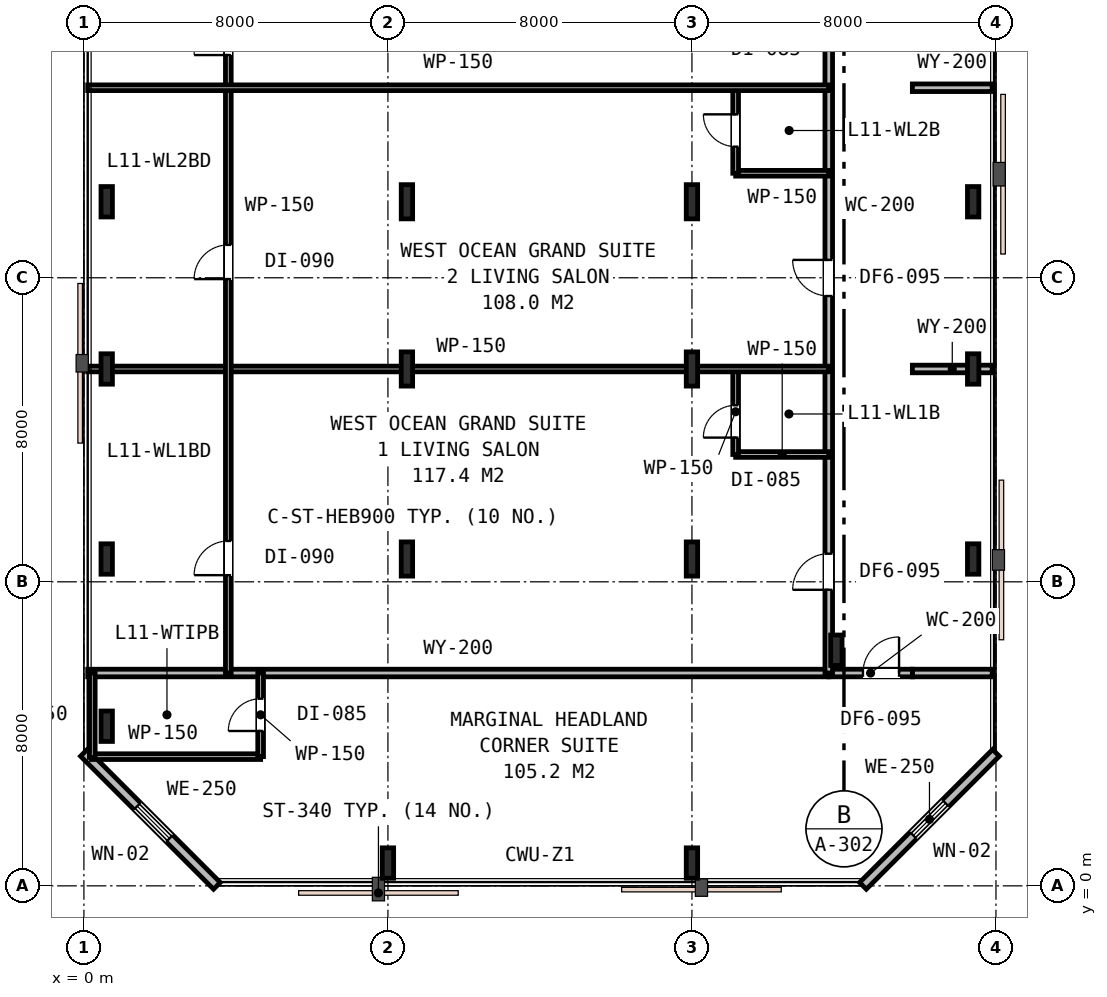
"""IFC4 building model, lengths in metres.
Left out: names, types, materials, properties, quantities, classifications, styles, units other than length and angle.
Written with IfcOpenShell. Run it as: python <this file> out.ifc"""

import sys

from ifc_helpers import new_model, si_unit, direction, frame, frame_2d, origin, origin_2d, place, context, subcontext, project, spatial, rectangle, i_section, extrude, element, fill, save


model = new_model("IFC4")
c1 = context("Model", 3, precision=1e-05, world=origin(), true_north=direction((0.0, 1.0)))
c2 = subcontext(c1, "Body", "Model", "MODEL_VIEW")
j1 = project(units=[si_unit("LENGTHUNIT", "METRE"), si_unit("PLANEANGLEUNIT", "RADIAN")], contexts=[c1])
p1 = place(None, origin())
s1 = spatial("IfcSite", under=j1, at=p1, CompositionType="ELEMENT")
p2 = place(p1, origin())
s2 = spatial("IfcBuilding", under=s1, at=p2, CompositionType="ELEMENT")
p3 = place(p2, frame((0.0, 0.0, 47.4)))
s3 = spatial("IfcBuildingStorey", under=s2, at=p3, CompositionType="ELEMENT", Elevation=47.4)
for number, where, z_axis, x_axis in (
    (1, (0.6, 8.6, 0.0), (0.0, 0.0, 1.0), (1.0, 0.0, 0.0)),
    (2, (0.6, 13.6, 0.0), (0.0, 0.0, 1.0), (1.0, 0.0, 0.0)),
    (3, (0.6, 18.0, 0.0), (0.0, 0.0, 1.0), (1.0, 0.0, 0.0)),
    (4, (0.6, 4.2, 0.0), (0.0, 0.0, 1.0), (1.0, 0.0, 0.0)),
    (5, (8.0, 0.6, 0.0), (0.0, 0.0, 1.0), (1.0, 0.0, 0.0)),
    (6, (16.0, 0.6, 0.0), (0.0, 0.0, 1.0), (1.0, 0.0, 0.0)),
    (7, (19.8, 6.2, 0.0), (0.0, 0.0, 1.0), (1.0, 0.0, 0.0)),
    (8, (23.4, 8.6, 0.0), (0.0, 0.0, 1.0), (1.0, 0.0, 0.0)),
    (9, (23.4, 13.6, 0.0), (0.0, 0.0, 1.0), (1.0, 0.0, 0.0)),
    (10, (23.4, 18.0, 0.0), (0.0, 0.0, 1.0), (1.0, 0.0, 0.0)),
):
    element("IfcColumn", number, at=place(p3, frame(where, z_axis=z_axis, x_axis=x_axis)), inside=s3, PredefinedType="COLUMN", context=c2, shape_type="SweptSolid", body=[
        extrude(i_section(OverallWidth=0.3, OverallDepth=0.8, WebThickness=0.018, FlangeThickness=0.033, FilletRadius=0.03, at=origin_2d()), origin(), (0.0, 0.0, 1.0), 3.6),
    ])
for number, where, z_axis, x_axis in (
    (11, (8.5, 8.6, 0.0), (0.0, 0.0, 1.0), (1.0, 0.0, 0.0)),
    (12, (16.0, 8.6, 0.0), (0.0, 0.0, 1.0), (1.0, 0.0, 0.0)),
    (13, (8.5, 13.6, 0.0), (0.0, 0.0, 1.0), (1.0, 0.0, 0.0)),
    (14, (16.0, 13.6, 0.0), (0.0, 0.0, 1.0), (1.0, 0.0, 0.0)),
    (15, (8.5, 18.0, 0.0), (0.0, 0.0, 1.0), (1.0, 0.0, 0.0)),
    (16, (16.0, 18.0, 0.0), (0.0, 0.0, 1.0), (1.0, 0.0, 0.0)),
):
    element("IfcColumn", number, at=place(p3, frame(where, z_axis=z_axis, x_axis=x_axis)), inside=s3, PredefinedType="COLUMN", context=c2, shape_type="SweptSolid", body=[
        extrude(i_section(OverallWidth=0.3, OverallDepth=0.9, WebThickness=0.018, FlangeThickness=0.035, FilletRadius=0.03, at=origin_2d()), origin(), (0.0, 0.0, 1.0), 3.6),
    ])
p4 = place(p3, frame((20.5, 0.0, 0.0), z_axis=(0.0, 0.0, 1.0), x_axis=(0.707106781187, 0.707106781187, 0.0)))
e17 = element("IfcWall", 17, at=p4, inside=s3, PredefinedType="STANDARD", context=c2, shape_type="SweptSolid", body=[
    extrude(rectangle(XDim=4.95, YDim=0.25, at=frame_2d((2.475, 0.0))), origin(), (0.0, 0.0, 1.0), 3.33),
])
p5 = place(p4, frame((1.875, 0.0, 0.85)))
e18 = element("IfcOpeningElement", 18, at=p5, cuts=e17, PredefinedType="OPENING", context=c2, shape_type="SweptSolid", body=[
    extrude(rectangle(XDim=1.2, YDim=1.6, at=frame_2d((0.6, 0.8))), frame((0.0, 0.135, 0.0), z_axis=(0.0, -1.0, 0.0), x_axis=(1.0, 0.0, 0.0)), (0.0, 0.0, 1.0), 0.27),
])
p6 = place(p3, frame((0.0, 3.5, 0.0), z_axis=(0.0, 0.0, 1.0), x_axis=(0.707106781187, -0.707106781187, 0.0)))
e19 = element("IfcWall", 19, at=p6, inside=s3, PredefinedType="STANDARD", context=c2, shape_type="SweptSolid", body=[
    extrude(rectangle(XDim=4.95, YDim=0.25, at=frame_2d((2.475, 0.0))), origin(), (0.0, 0.0, 1.0), 3.33),
])
p7 = place(p6, frame((1.985, 0.0, 0.85)))
e20 = element("IfcOpeningElement", 20, at=p7, cuts=e19, PredefinedType="OPENING", context=c2, shape_type="SweptSolid", body=[
    extrude(rectangle(XDim=1.2, YDim=1.6, at=frame_2d((0.6, 0.8))), frame((0.0, 0.135, 0.0), z_axis=(0.0, -1.0, 0.0), x_axis=(1.0, 0.0, 0.0)), (0.0, 0.0, 1.0), 0.27),
])
p8 = place(p3, frame((0.1, 5.6, 0.0), z_axis=(0.0, 0.0, 1.0), x_axis=(1.0, 0.0, 0.0)))
e21 = element("IfcWall", 21, at=p8, inside=s3, PredefinedType="PARTITIONING", context=c2, shape_type="SweptSolid", body=[
    extrude(rectangle(XDim=19.5, YDim=0.2, at=frame_2d((9.75, 0.0))), origin(), (0.0, 0.0, 1.0), 2.82),
])
p9 = place(p3, frame((21.8, 5.6, 0.0), z_axis=(0.0, 0.0, 1.0), x_axis=(1.0, 0.0, 0.0)))
e22 = element("IfcWall", 22, at=p9, inside=s3, PredefinedType="PARTITIONING", context=c2, shape_type="SweptSolid", body=[
    extrude(rectangle(XDim=2.1, YDim=0.2, at=frame_2d((1.05, 0.0))), origin(), (0.0, 0.0, 1.0), 3.33),
])
p10 = place(p3, frame((19.6, 5.6, 0.0), z_axis=(0.0, 0.0, 1.0), x_axis=(1.0, 0.0, 0.0)))
e23 = element("IfcWall", 23, at=p10, inside=s3, PredefinedType="PARTITIONING", context=c2, shape_type="SweptSolid", body=[
    extrude(rectangle(XDim=2.2, YDim=0.2, at=frame_2d((1.1, 0.0))), origin(), (0.0, 0.0, 1.0), 3.33),
])
p11 = place(p10, frame((0.9, 0.0, 0.0)))
e24 = element("IfcOpeningElement", 24, at=p11, cuts=e23, PredefinedType="OPENING", context=c2, shape_type="SweptSolid", body=[
    extrude(rectangle(XDim=0.95, YDim=2.15, at=frame_2d((0.475, 1.075))), frame((0.0, 0.11, 0.0), z_axis=(0.0, -1.0, 0.0), x_axis=(1.0, 0.0, 0.0)), (0.0, 0.0, 1.0), 0.22),
])
p12 = place(p3, frame((0.2, 3.4, 0.0), z_axis=(0.0, 0.0, 1.0), x_axis=(1.0, 0.0, 0.0)))
e25 = element("IfcWall", 25, at=p12, inside=s3, PredefinedType="PARTITIONING", context=c2, shape_type="SweptSolid", body=[
    extrude(rectangle(XDim=4.45, YDim=0.15, at=frame_2d((2.225, 0.0))), origin(), (0.0, 0.0, 1.0), 3.33),
])
p13 = place(p3, frame((4.65, 3.4, 0.0), z_axis=(0.0, 0.0, 1.0), x_axis=(0.0, 1.0, 0.0)))
e26 = element("IfcWall", 26, at=p13, inside=s3, PredefinedType="PARTITIONING", context=c2, shape_type="SweptSolid", body=[
    extrude(rectangle(XDim=2.2, YDim=0.15, at=frame_2d((1.1, 0.0))), origin(), (0.0, 0.0, 1.0), 3.33),
])
p14 = place(p13, frame((0.675, 0.0, 0.0)))
e27 = element("IfcOpeningElement", 27, at=p14, cuts=e26, PredefinedType="OPENING", context=c2, shape_type="SweptSolid", body=[
    extrude(rectangle(XDim=0.85, YDim=2.15, at=frame_2d((0.425, 1.075))), frame((0.0, 0.085, 0.0), z_axis=(0.0, -1.0, 0.0), x_axis=(1.0, 0.0, 0.0)), (0.0, 0.0, 1.0), 0.17),
])
p15 = place(p3, frame((0.22, 3.38, 0.0), z_axis=(0.0, 0.0, 1.0), x_axis=(0.0, 1.0, 0.0)))
e28 = element("IfcWall", 28, at=p15, inside=s3, PredefinedType="PARTITIONING", context=c2, shape_type="SweptSolid", body=[
    extrude(rectangle(XDim=2.22, YDim=0.15, at=frame_2d((1.11, 0.0))), origin(), (0.0, 0.0, 1.0), 2.93),
])
p16 = place(p3, frame((19.6, 5.6, 0.0), z_axis=(0.0, 0.0, 1.0), x_axis=(0.0, 1.0, 0.0)))
e29 = element("IfcWall", 29, at=p16, inside=s3, PredefinedType="PARTITIONING", context=c2, shape_type="SweptSolid", body=[
    extrude(rectangle(XDim=23.0, YDim=0.2, at=frame_2d((11.5, 0.0))), origin(), (0.0, 0.0, 1.0), 2.82),
])
p17 = place(p16, frame((2.19, 0.0, 0.0)))
e30 = element("IfcOpeningElement", 30, at=p17, cuts=e29, PredefinedType="OPENING", context=c2, shape_type="SweptSolid", body=[
    extrude(rectangle(XDim=0.95, YDim=2.15, at=frame_2d((0.475, 1.075))), frame((0.0, 0.11, 0.0), z_axis=(0.0, -1.0, 0.0), x_axis=(1.0, 0.0, 0.0)), (0.0, 0.0, 1.0), 0.22),
])
p18 = place(p16, frame((9.92, 0.0, 0.0)))
e31 = element("IfcOpeningElement", 31, at=p18, cuts=e29, PredefinedType="OPENING", context=c2, shape_type="SweptSolid", body=[
    extrude(rectangle(XDim=0.95, YDim=2.15, at=frame_2d((0.475, 1.075))), frame((0.0, 0.11, 0.0), z_axis=(0.0, -1.0, 0.0), x_axis=(1.0, 0.0, 0.0)), (0.0, 0.0, 1.0), 0.22),
])
p19 = place(p16, frame((17.41, 0.0, 0.0)))
e32 = element("IfcOpeningElement", 32, at=p19, cuts=e29, PredefinedType="OPENING", context=c2, shape_type="SweptSolid", body=[
    extrude(rectangle(XDim=0.95, YDim=2.15, at=frame_2d((0.475, 1.075))), frame((0.0, 0.11, 0.0), z_axis=(0.0, -1.0, 0.0), x_axis=(1.0, 0.0, 0.0)), (0.0, 0.0, 1.0), 0.22),
])
p20 = place(p3, frame((17.15, 11.35, 0.0), z_axis=(0.0, 0.0, 1.0), x_axis=(1.0, 0.0, 0.0)))
e33 = element("IfcWall", 33, at=p20, inside=s3, PredefinedType="PARTITIONING", context=c2, shape_type="SweptSolid", body=[
    extrude(rectangle(XDim=2.45, YDim=0.15, at=frame_2d((1.225, 0.0))), origin(), (0.0, 0.0, 1.0), 2.96),
])
p21 = place(p3, frame((17.15, 11.35, 0.0), z_axis=(0.0, 0.0, 1.0), x_axis=(0.0, 1.0, 0.0)))
e34 = element("IfcWall", 34, at=p21, inside=s3, PredefinedType="PARTITIONING", context=c2, shape_type="SweptSolid", body=[
    extrude(rectangle(XDim=2.25, YDim=0.15, at=frame_2d((1.125, 0.0))), origin(), (0.0, 0.0, 1.0), 2.82),
])
p22 = place(p21, frame((0.444, 0.0, 0.0)))
e35 = element("IfcOpeningElement", 35, at=p22, cuts=e34, PredefinedType="OPENING", context=c2, shape_type="SweptSolid", body=[
    extrude(rectangle(XDim=0.85, YDim=2.15, at=frame_2d((0.425, 1.075))), frame((0.0, 0.085, 0.0), z_axis=(0.0, -1.0, 0.0), x_axis=(1.0, 0.0, 0.0)), (0.0, 0.0, 1.0), 0.17),
])
p23 = place(p3, frame((0.1, 13.6, 0.0), z_axis=(0.0, 0.0, 1.0), x_axis=(1.0, 0.0, 0.0)))
e36 = element("IfcWall", 36, at=p23, inside=s3, PredefinedType="PARTITIONING", context=c2, shape_type="SweptSolid", body=[
    extrude(rectangle(XDim=19.5, YDim=0.15, at=frame_2d((9.75, 0.0))), origin(), (0.0, 0.0, 1.0), 2.82),
])
p24 = place(p3, frame((3.8, 5.6, 0.0), z_axis=(0.0, 0.0, 1.0), x_axis=(0.0, 1.0, 0.0)))
e37 = element("IfcWall", 37, at=p24, inside=s3, PredefinedType="PARTITIONING", context=c2, shape_type="SweptSolid", body=[
    extrude(rectangle(XDim=23.0, YDim=0.15, at=frame_2d((11.5, 0.0))), origin(), (0.0, 0.0, 1.0), 2.82),
])
p25 = place(p24, frame((2.575, 0.0, 0.0)))
e38 = element("IfcOpeningElement", 38, at=p25, cuts=e37, PredefinedType="OPENING", context=c2, shape_type="SweptSolid", body=[
    extrude(rectangle(XDim=0.9, YDim=2.15, at=frame_2d((0.45, 1.075))), frame((0.0, 0.085, 0.0), z_axis=(0.0, -1.0, 0.0), x_axis=(1.0, 0.0, 0.0)), (0.0, 0.0, 1.0), 0.17),
])
p26 = place(p24, frame((10.365, 0.0, 0.0)))
e39 = element("IfcOpeningElement", 39, at=p26, cuts=e37, PredefinedType="OPENING", context=c2, shape_type="SweptSolid", body=[
    extrude(rectangle(XDim=0.9, YDim=2.15, at=frame_2d((0.45, 1.075))), frame((0.0, 0.085, 0.0), z_axis=(0.0, -1.0, 0.0), x_axis=(1.0, 0.0, 0.0)), (0.0, 0.0, 1.0), 0.17),
])
p27 = place(p24, frame((16.26, 0.0, 0.0)))
e40 = element("IfcOpeningElement", 40, at=p27, cuts=e37, PredefinedType="OPENING", context=c2, shape_type="SweptSolid", body=[
    extrude(rectangle(XDim=0.9, YDim=2.15, at=frame_2d((0.45, 1.075))), frame((0.0, 0.085, 0.0), z_axis=(0.0, -1.0, 0.0), x_axis=(1.0, 0.0, 0.0)), (0.0, 0.0, 1.0), 0.17),
])
p28 = place(p3, frame((21.8, 13.6, 0.0), z_axis=(0.0, 0.0, 1.0), x_axis=(1.0, 0.0, 0.0)))
e41 = element("IfcWall", 41, at=p28, inside=s3, PredefinedType="PARTITIONING", context=c2, shape_type="SweptSolid", body=[
    extrude(rectangle(XDim=2.1, YDim=0.2, at=frame_2d((1.05, 0.0))), origin(), (0.0, 0.0, 1.0), 2.82),
])
p29 = place(p3, frame((17.15, 18.75, 0.0), z_axis=(0.0, 0.0, 1.0), x_axis=(1.0, 0.0, 0.0)))
e42 = element("IfcWall", 42, at=p29, inside=s3, PredefinedType="PARTITIONING", context=c2, shape_type="SweptSolid", body=[
    extrude(rectangle(XDim=2.45, YDim=0.15, at=frame_2d((1.225, 0.0))), origin(), (0.0, 0.0, 1.0), 3.33),
])
p30 = place(p3, frame((17.15, 18.75, 0.0), z_axis=(0.0, 0.0, 1.0), x_axis=(0.0, 1.0, 0.0)))
e43 = element("IfcWall", 43, at=p30, inside=s3, PredefinedType="PARTITIONING", context=c2, shape_type="SweptSolid", body=[
    extrude(rectangle(XDim=2.25, YDim=0.15, at=frame_2d((1.125, 0.0))), origin(), (0.0, 0.0, 1.0), 3.33),
])
p31 = place(p30, frame((0.7, 0.0, 0.0)))
e44 = element("IfcOpeningElement", 44, at=p31, cuts=e43, PredefinedType="OPENING", context=c2, shape_type="SweptSolid", body=[
    extrude(rectangle(XDim=0.85, YDim=2.15, at=frame_2d((0.425, 1.075))), frame((0.0, 0.085, 0.0), z_axis=(0.0, -1.0, 0.0), x_axis=(1.0, 0.0, 0.0)), (0.0, 0.0, 1.0), 0.17),
])
p32 = place(p3, frame((0.1, 21.0, 0.0), z_axis=(0.0, 0.0, 1.0), x_axis=(1.0, 0.0, 0.0)))
e45 = element("IfcWall", 45, at=p32, inside=s3, PredefinedType="PARTITIONING", context=c2, shape_type="SweptSolid", body=[
    extrude(rectangle(XDim=19.5, YDim=0.15, at=frame_2d((9.75, 0.0))), origin(), (0.0, 0.0, 1.0), 2.82),
])
p33 = place(p3, frame((21.8, 21.0, 0.0), z_axis=(0.0, 0.0, 1.0), x_axis=(1.0, 0.0, 0.0)))
e46 = element("IfcWall", 46, at=p33, inside=s3, PredefinedType="PARTITIONING", context=c2, shape_type="SweptSolid", body=[
    extrude(rectangle(XDim=2.1, YDim=0.2, at=frame_2d((1.05, 0.0))), origin(), (0.0, 0.0, 1.0), 3.33),
])
p34 = place(p5, origin())
e47 = element("IfcWindow", 47, at=p34, inside=s3, PartitioningType="SINGLE_PANEL", PredefinedType="WINDOW", context=c2, shape_type="SweptSolid", body=[
    extrude(rectangle(XDim=1.2, YDim=1.6, at=frame_2d((0.6, 0.8))), frame((0.0, 0.03, 0.0), z_axis=(0.0, -1.0, 0.0), x_axis=(1.0, 0.0, 0.0)), (0.0, 0.0, 1.0), 0.06),
])
fill(e18, e47)
p35 = place(p7, origin())
e48 = element("IfcWindow", 48, at=p35, inside=s3, PartitioningType="SINGLE_PANEL", PredefinedType="WINDOW", context=c2, shape_type="SweptSolid", body=[
    extrude(rectangle(XDim=1.2, YDim=1.6, at=frame_2d((0.6, 0.8))), frame((0.0, 0.03, 0.0), z_axis=(0.0, -1.0, 0.0), x_axis=(1.0, 0.0, 0.0)), (0.0, 0.0, 1.0), 0.06),
])
fill(e20, e48)
p36 = place(p11, origin())
e49 = element("IfcDoor", 49, at=p36, inside=s3, OperationType="SINGLE_SWING_RIGHT", PredefinedType="DOOR", context=c2, shape_type="SweptSolid", body=[
    extrude(rectangle(XDim=0.95, YDim=2.15, at=frame_2d((0.475, 1.075))), frame((0.0, 0.025, 0.0), z_axis=(0.0, -1.0, 0.0), x_axis=(1.0, 0.0, 0.0)), (0.0, 0.0, 1.0), 0.05),
])
fill(e24, e49)
p37 = place(p14, origin())
e50 = element("IfcDoor", 50, at=p37, inside=s3, OperationType="SINGLE_SWING_LEFT", PredefinedType="DOOR", context=c2, shape_type="SweptSolid", body=[
    extrude(rectangle(XDim=0.85, YDim=2.15, at=frame_2d((0.425, 1.075))), frame((0.0, 0.025, 0.0), z_axis=(0.0, -1.0, 0.0), x_axis=(1.0, 0.0, 0.0)), (0.0, 0.0, 1.0), 0.05),
])
fill(e27, e50)
p38 = place(p17, origin())
e51 = element("IfcDoor", 51, at=p38, inside=s3, OperationType="SINGLE_SWING_LEFT", PredefinedType="DOOR", context=c2, shape_type="SweptSolid", body=[
    extrude(rectangle(XDim=0.95, YDim=2.15, at=frame_2d((0.475, 1.075))), frame((0.0, 0.025, 0.0), z_axis=(0.0, -1.0, 0.0), x_axis=(1.0, 0.0, 0.0)), (0.0, 0.0, 1.0), 0.05),
])
fill(e30, e51)
p39 = place(p22, origin())
e52 = element("IfcDoor", 52, at=p39, inside=s3, OperationType="SINGLE_SWING_LEFT", PredefinedType="DOOR", context=c2, shape_type="SweptSolid", body=[
    extrude(rectangle(XDim=0.85, YDim=2.15, at=frame_2d((0.425, 1.075))), frame((0.0, 0.025, 0.0), z_axis=(0.0, -1.0, 0.0), x_axis=(1.0, 0.0, 0.0)), (0.0, 0.0, 1.0), 0.05),
])
fill(e35, e52)
p40 = place(p25, origin())
e53 = element("IfcDoor", 53, at=p40, inside=s3, OperationType="SINGLE_SWING_LEFT", PredefinedType="DOOR", context=c2, shape_type="SweptSolid", body=[
    extrude(rectangle(XDim=0.9, YDim=2.15, at=frame_2d((0.45, 1.075))), frame((0.0, 0.025, 0.0), z_axis=(0.0, -1.0, 0.0), x_axis=(1.0, 0.0, 0.0)), (0.0, 0.0, 1.0), 0.05),
])
fill(e38, e53)
p41 = place(p18, origin())
e54 = element("IfcDoor", 54, at=p41, inside=s3, OperationType="SINGLE_SWING_RIGHT", PredefinedType="DOOR", context=c2, shape_type="SweptSolid", body=[
    extrude(rectangle(XDim=0.95, YDim=2.15, at=frame_2d((0.475, 1.075))), frame((0.0, 0.025, 0.0), z_axis=(0.0, -1.0, 0.0), x_axis=(1.0, 0.0, 0.0)), (0.0, 0.0, 1.0), 0.05),
])
fill(e31, e54)
p42 = place(p31, origin())
e55 = element("IfcDoor", 55, at=p42, inside=s3, OperationType="SINGLE_SWING_RIGHT", PredefinedType="DOOR", context=c2, shape_type="SweptSolid", body=[
    extrude(rectangle(XDim=0.85, YDim=2.15, at=frame_2d((0.425, 1.075))), frame((0.0, 0.025, 0.0), z_axis=(0.0, -1.0, 0.0), x_axis=(1.0, 0.0, 0.0)), (0.0, 0.0, 1.0), 0.05),
])
fill(e44, e55)
p43 = place(p26, origin())
e56 = element("IfcDoor", 56, at=p43, inside=s3, OperationType="SINGLE_SWING_LEFT", PredefinedType="DOOR", context=c2, shape_type="SweptSolid", body=[
    extrude(rectangle(XDim=0.9, YDim=2.15, at=frame_2d((0.45, 1.075))), frame((0.0, 0.025, 0.0), z_axis=(0.0, -1.0, 0.0), x_axis=(1.0, 0.0, 0.0)), (0.0, 0.0, 1.0), 0.05),
])
fill(e39, e56)
p44 = place(p27, origin())
e57 = element("IfcDoor", 57, at=p44, inside=s3, OperationType="SINGLE_SWING_LEFT", PredefinedType="DOOR", context=c2, shape_type="SweptSolid", body=[
    extrude(rectangle(XDim=0.9, YDim=2.15, at=frame_2d((0.45, 1.075))), frame((0.0, 0.025, 0.0), z_axis=(0.0, -1.0, 0.0), x_axis=(1.0, 0.0, 0.0)), (0.0, 0.0, 1.0), 0.05),
])
fill(e40, e57)
save(model, sys.argv[1])
